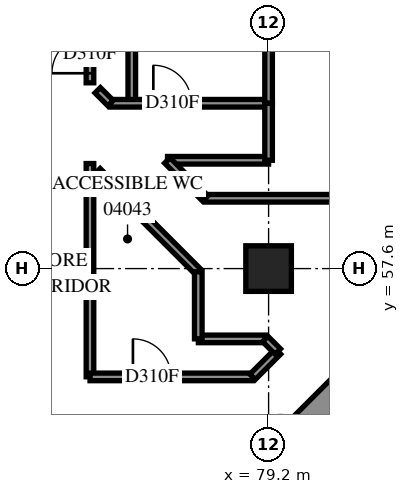
"""IFC4 building model, lengths in metres.
Left out: names, types, materials, properties, quantities, classifications, styles, units other than length and angle.
Written with IfcOpenShell. Run it as: python <this file> out.ifc"""

import sys

from ifc_helpers import new_model, si_unit, direction, frame, frame_2d, origin, origin_2d, place, context, subcontext, project, spatial, polyline, rectangle, outline, extrude, element, fill, save


model = new_model("IFC4")
c1 = context("Model", 3, precision=1e-05, world=origin(), true_north=direction((0.0, 1.0)))
c2 = subcontext(c1, "Body", "Model", "MODEL_VIEW")
j1 = project(units=[si_unit("LENGTHUNIT", "METRE"), si_unit("PLANEANGLEUNIT", "RADIAN")], contexts=[c1])
p1 = place(None, origin())
s1 = spatial("IfcSite", under=j1, at=p1, CompositionType="ELEMENT")
p2 = place(p1, origin())
s2 = spatial("IfcBuilding", under=s1, at=p2, CompositionType="ELEMENT")
p3 = place(p2, frame((0.0, 0.0, 18.6)))
s3 = spatial("IfcBuildingStorey", under=s2, at=p3, CompositionType="ELEMENT", Elevation=18.6)
p4 = place(p3, frame((79.2, 57.6, 0.0), z_axis=(0.0, 0.0, 1.0), x_axis=(1.0, 0.0, 0.0)))
e1 = element("IfcColumn", 1, at=p4, inside=s3, PredefinedType="COLUMN", context=c2, shape_type="SweptSolid", body=[
    extrude(rectangle(XDim=1.2, YDim=1.2, at=origin_2d()), origin(), (0.0, 0.0, 1.0), 3.8),
])
p5 = place(p3, frame((76.301, 49.443, -0.4), z_axis=(0.0, 0.0, 1.0), x_axis=(0.7071067812, 0.7071067812, 0.0)))
e2 = element("IfcWall", 2, at=p5, inside=s3, PredefinedType="SHEAR", context=c2, shape_type="SweptSolid", body=[
    extrude(rectangle(XDim=14.4, YDim=1.0, at=frame_2d((7.2, 0.0))), origin(), (0.0, 0.0, 1.0), 3.5),
])
p6 = place(p5, frame((4.55, 0.0, 0.4)))
e3 = element("IfcOpeningElement", 3, at=p6, cuts=e2, PredefinedType="OPENING", context=c2, shape_type="SweptSolid", body=[
    extrude(rectangle(XDim=1.1, YDim=2.1, at=frame_2d((0.55, 1.05))), frame((0.0, 0.51, 0.0), z_axis=(0.0, -1.0, 0.0), x_axis=(1.0, 0.0, 0.0)), (0.0, 0.0, 1.0), 1.02),
])
p7 = place(p5, frame((11.35, 0.0, 0.4)))
e4 = element("IfcOpeningElement", 4, at=p7, cuts=e2, PredefinedType="OPENING", context=c2, shape_type="SweptSolid", body=[
    extrude(rectangle(XDim=1.1, YDim=2.1, at=frame_2d((0.55, 1.05))), frame((0.0, 0.51, 0.0), z_axis=(0.0, -1.0, 0.0), x_axis=(1.0, 0.0, 0.0)), (0.0, 0.0, 1.0), 1.02),
])
p8 = place(p3, frame((117.843, 34.665, 0.0), z_axis=(0.0, 0.0, 1.0), x_axis=(-0.7071067812, 0.7071067812, 0.0)))
e5 = element("IfcWall", 5, at=p8, inside=s3, PredefinedType="SOLIDWALL", context=c2, shape_type="SweptSolid", body=[
    extrude(outline(polyline([(-0.275, -0.275), (54.222, -0.275), (53.994, 0.275), (0.275, 0.275), (-0.275, -0.275)])), origin(), (0.0, 0.0, 1.0), 3.8),
])
p9 = place(p8, frame((0.8, 0.0, 0.7)))
e6 = element("IfcOpeningElement", 6, at=p9, cuts=e5, PredefinedType="OPENING", context=c2, shape_type="SweptSolid", body=[
    extrude(rectangle(XDim=1.8, YDim=2.4, at=frame_2d((0.9, 1.2))), frame((0.0, 0.285, 0.0), z_axis=(0.0, -1.0, 0.0), x_axis=(1.0, 0.0, 0.0)), (0.0, 0.0, 1.0), 0.57),
])
p10 = place(p8, frame((4.225, 0.0, 0.7)))
e7 = element("IfcOpeningElement", 7, at=p10, cuts=e5, PredefinedType="OPENING", context=c2, shape_type="SweptSolid", body=[
    extrude(rectangle(XDim=1.8, YDim=2.4, at=frame_2d((0.9, 1.2))), frame((0.0, 0.285, 0.0), z_axis=(0.0, -1.0, 0.0), x_axis=(1.0, 0.0, 0.0)), (0.0, 0.0, 1.0), 0.57),
])
p11 = place(p8, frame((7.825, 0.0, 0.7)))
e8 = element("IfcOpeningElement", 8, at=p11, cuts=e5, PredefinedType="OPENING", context=c2, shape_type="SweptSolid", body=[
    extrude(rectangle(XDim=1.8, YDim=2.4, at=frame_2d((0.9, 1.2))), frame((0.0, 0.285, 0.0), z_axis=(0.0, -1.0, 0.0), x_axis=(1.0, 0.0, 0.0)), (0.0, 0.0, 1.0), 0.57),
])
p12 = place(p8, frame((11.425, 0.0, 0.7)))
e9 = element("IfcOpeningElement", 9, at=p12, cuts=e5, PredefinedType="OPENING", context=c2, shape_type="SweptSolid", body=[
    extrude(rectangle(XDim=1.8, YDim=2.4, at=frame_2d((0.9, 1.2))), frame((0.0, 0.285, 0.0), z_axis=(0.0, -1.0, 0.0), x_axis=(1.0, 0.0, 0.0)), (0.0, 0.0, 1.0), 0.57),
])
p13 = place(p8, frame((15.025, 0.0, 0.7)))
e10 = element("IfcOpeningElement", 10, at=p13, cuts=e5, PredefinedType="OPENING", context=c2, shape_type="SweptSolid", body=[
    extrude(rectangle(XDim=1.8, YDim=2.4, at=frame_2d((0.9, 1.2))), frame((0.0, 0.285, 0.0), z_axis=(0.0, -1.0, 0.0), x_axis=(1.0, 0.0, 0.0)), (0.0, 0.0, 1.0), 0.57),
])
p14 = place(p8, frame((18.625, 0.0, 0.7)))
e11 = element("IfcOpeningElement", 11, at=p14, cuts=e5, PredefinedType="OPENING", context=c2, shape_type="SweptSolid", body=[
    extrude(rectangle(XDim=1.8, YDim=2.4, at=frame_2d((0.9, 1.2))), frame((0.0, 0.285, 0.0), z_axis=(0.0, -1.0, 0.0), x_axis=(1.0, 0.0, 0.0)), (0.0, 0.0, 1.0), 0.57),
])
p15 = place(p8, frame((22.225, 0.0, 0.7)))
e12 = element("IfcOpeningElement", 12, at=p15, cuts=e5, PredefinedType="OPENING", context=c2, shape_type="SweptSolid", body=[
    extrude(rectangle(XDim=1.8, YDim=2.4, at=frame_2d((0.9, 1.2))), frame((0.0, 0.285, 0.0), z_axis=(0.0, -1.0, 0.0), x_axis=(1.0, 0.0, 0.0)), (0.0, 0.0, 1.0), 0.57),
])
p16 = place(p8, frame((25.825, 0.0, 0.7)))
e13 = element("IfcOpeningElement", 13, at=p16, cuts=e5, PredefinedType="OPENING", context=c2, shape_type="SweptSolid", body=[
    extrude(rectangle(XDim=1.8, YDim=2.4, at=frame_2d((0.9, 1.2))), frame((0.0, 0.285, 0.0), z_axis=(0.0, -1.0, 0.0), x_axis=(1.0, 0.0, 0.0)), (0.0, 0.0, 1.0), 0.57),
])
p17 = place(p8, frame((29.425, 0.0, 0.7)))
e14 = element("IfcOpeningElement", 14, at=p17, cuts=e5, PredefinedType="OPENING", context=c2, shape_type="SweptSolid", body=[
    extrude(rectangle(XDim=1.8, YDim=2.4, at=frame_2d((0.9, 1.2))), frame((0.0, 0.285, 0.0), z_axis=(0.0, -1.0, 0.0), x_axis=(1.0, 0.0, 0.0)), (0.0, 0.0, 1.0), 0.57),
])
p18 = place(p8, frame((33.025, 0.0, 0.7)))
e15 = element("IfcOpeningElement", 15, at=p18, cuts=e5, PredefinedType="OPENING", context=c2, shape_type="SweptSolid", body=[
    extrude(rectangle(XDim=1.8, YDim=2.4, at=frame_2d((0.9, 1.2))), frame((0.0, 0.285, 0.0), z_axis=(0.0, -1.0, 0.0), x_axis=(1.0, 0.0, 0.0)), (0.0, 0.0, 1.0), 0.57),
])
p19 = place(p8, frame((36.625, 0.0, 0.7)))
e16 = element("IfcOpeningElement", 16, at=p19, cuts=e5, PredefinedType="OPENING", context=c2, shape_type="SweptSolid", body=[
    extrude(rectangle(XDim=1.8, YDim=2.4, at=frame_2d((0.9, 1.2))), frame((0.0, 0.285, 0.0), z_axis=(0.0, -1.0, 0.0), x_axis=(1.0, 0.0, 0.0)), (0.0, 0.0, 1.0), 0.57),
])
p20 = place(p8, frame((40.225, 0.0, 0.7)))
e17 = element("IfcOpeningElement", 17, at=p20, cuts=e5, PredefinedType="OPENING", context=c2, shape_type="SweptSolid", body=[
    extrude(rectangle(XDim=1.8, YDim=2.4, at=frame_2d((0.9, 1.2))), frame((0.0, 0.285, 0.0), z_axis=(0.0, -1.0, 0.0), x_axis=(1.0, 0.0, 0.0)), (0.0, 0.0, 1.0), 0.57),
])
p21 = place(p8, frame((43.825, 0.0, 0.7)))
e18 = element("IfcOpeningElement", 18, at=p21, cuts=e5, PredefinedType="OPENING", context=c2, shape_type="SweptSolid", body=[
    extrude(rectangle(XDim=1.8, YDim=2.4, at=frame_2d((0.9, 1.2))), frame((0.0, 0.285, 0.0), z_axis=(0.0, -1.0, 0.0), x_axis=(1.0, 0.0, 0.0)), (0.0, 0.0, 1.0), 0.57),
])
p22 = place(p8, frame((47.425, 0.0, 0.7)))
e19 = element("IfcOpeningElement", 19, at=p22, cuts=e5, PredefinedType="OPENING", context=c2, shape_type="SweptSolid", body=[
    extrude(rectangle(XDim=1.8, YDim=2.4, at=frame_2d((0.9, 1.2))), frame((0.0, 0.285, 0.0), z_axis=(0.0, -1.0, 0.0), x_axis=(1.0, 0.0, 0.0)), (0.0, 0.0, 1.0), 0.57),
])
p23 = place(p8, frame((51.06, 0.0, 0.7)))
e20 = element("IfcOpeningElement", 20, at=p23, cuts=e5, PredefinedType="OPENING", context=c2, shape_type="SweptSolid", body=[
    extrude(rectangle(XDim=1.8, YDim=2.4, at=frame_2d((0.9, 1.2))), frame((0.0, 0.285, 0.0), z_axis=(0.0, -1.0, 0.0), x_axis=(1.0, 0.0, 0.0)), (0.0, 0.0, 1.0), 0.57),
])
p24 = place(p3, frame((75.6, 61.95, 0.0), z_axis=(0.0, 0.0, 1.0), x_axis=(0.0, 1.0, 0.0)))
e21 = element("IfcWall", 21, at=p24, inside=s3, PredefinedType="PARTITIONING", context=c2, shape_type="SweptSolid", body=[
    extrude(rectangle(XDim=10.7, YDim=0.2, at=frame_2d((5.35, 0.0))), origin(), (0.0, 0.0, 1.0), 3.8),
])
p25 = place(p3, frame((74.5, 54.752, 0.0), z_axis=(0.0, 0.0, 1.0), x_axis=(0.0, 1.0, 0.0)))
e22 = element("IfcWall", 22, at=p25, inside=s3, PredefinedType="PARTITIONING", context=c2, shape_type="SweptSolid", body=[
    extrude(rectangle(XDim=5.612, YDim=0.2, at=frame_2d((2.806, 0.0))), origin(), (0.0, 0.0, 1.0), 3.8),
])
p26 = place(p3, frame((74.5, 62.488, 0.0), z_axis=(0.0, 0.0, 1.0), x_axis=(0.0, 1.0, 0.0)))
e23 = element("IfcWall", 23, at=p26, inside=s3, PredefinedType="PARTITIONING", context=c2, shape_type="SweptSolid", body=[
    extrude(rectangle(XDim=4.812, YDim=0.2, at=frame_2d((2.406, 0.0))), origin(), (0.0, 0.0, 1.0), 3.8),
])
p27 = place(p26, frame((0.252, 0.0, 0.0)))
e24 = element("IfcOpeningElement", 24, at=p27, cuts=e23, PredefinedType="OPENING", context=c2, shape_type="SweptSolid", body=[
    extrude(rectangle(XDim=1.0, YDim=2.1, at=frame_2d((0.5, 1.05))), frame((0.0, 0.11, 0.0), z_axis=(0.0, -1.0, 0.0), x_axis=(1.0, 0.0, 0.0)), (0.0, 0.0, 1.0), 0.22),
])
p28 = place(p3, frame((74.502, 54.75, 0.0), z_axis=(0.0, 0.0, 1.0), x_axis=(1.0, 0.0, 0.0)))
e25 = element("IfcWall", 25, at=p28, inside=s3, PredefinedType="PARTITIONING", context=c2, shape_type="SweptSolid", body=[
    extrude(rectangle(XDim=4.276, YDim=0.2, at=frame_2d((2.138, 0.0))), origin(), (0.0, 0.0, 1.0), 3.8),
])
p29 = place(p28, frame((1.129, 0.0, 0.0)))
e26 = element("IfcOpeningElement", 26, at=p29, cuts=e25, PredefinedType="OPENING", context=c2, shape_type="SweptSolid", body=[
    extrude(rectangle(XDim=1.0, YDim=2.1, at=frame_2d((0.5, 1.05))), frame((0.0, 0.11, 0.0), z_axis=(0.0, -1.0, 0.0), x_axis=(1.0, 0.0, 0.0)), (0.0, 0.0, 1.0), 0.22),
])
p30 = place(p3, frame((75.038, 61.95, 0.0), z_axis=(0.0, 0.0, 1.0), x_axis=(1.0, 0.0, 0.0)))
e27 = element("IfcWall", 27, at=p30, inside=s3, PredefinedType="PARTITIONING", context=c2, shape_type="SweptSolid", body=[
    extrude(rectangle(XDim=4.162, YDim=0.2, at=frame_2d((2.081, 0.0))), origin(), (0.0, 0.0, 1.0), 3.8),
])
p31 = place(p30, frame((1.129, 0.0, 0.0)))
e28 = element("IfcOpeningElement", 28, at=p31, cuts=e27, PredefinedType="OPENING", context=c2, shape_type="SweptSolid", body=[
    extrude(rectangle(XDim=1.0, YDim=2.1, at=frame_2d((0.5, 1.05))), frame((0.0, 0.11, 0.0), z_axis=(0.0, -1.0, 0.0), x_axis=(1.0, 0.0, 0.0)), (0.0, 0.0, 1.0), 0.22),
])
p32 = place(p3, frame((74.697, 60.163, 0.0), z_axis=(0.0, 0.0, 1.0), x_axis=(0.7071067812, -0.7071067812, 0.0)))
e29 = element("IfcWall", 29, at=p32, inside=s3, PredefinedType="PARTITIONING", context=c2, shape_type="SweptSolid", body=[
    extrude(rectangle(XDim=3.748, YDim=0.2, at=frame_2d((1.874, 0.0))), origin(), (0.0, 0.0, 1.0), 3.8),
])
p33 = place(p3, frame((77.538, 59.45, 0.0), z_axis=(0.0, 0.0, 1.0), x_axis=(1.0, 0.0, 0.0)))
e30 = element("IfcWall", 30, at=p33, inside=s3, PredefinedType="PARTITIONING", context=c2, shape_type="SweptSolid", body=[
    extrude(rectangle(XDim=3.512, YDim=0.2, at=frame_2d((1.756, 0.0))), origin(), (0.0, 0.0, 1.0), 3.8),
])
p34 = place(p3, frame((76.54, 60.45, 0.0), z_axis=(0.0, 0.0, 1.0), x_axis=(1.0, 0.0, 0.0)))
e31 = element("IfcWall", 31, at=p34, inside=s3, PredefinedType="PARTITIONING", context=c2, shape_type="SweptSolid", body=[
    extrude(rectangle(XDim=2.66, YDim=0.2, at=frame_2d((1.33, 0.0))), origin(), (0.0, 0.0, 1.0), 3.8),
])
p35 = place(p3, frame((79.2, 61.95, 0.0), z_axis=(0.0, 0.0, 1.0), x_axis=(0.0, 1.0, 0.0)))
e32 = element("IfcWall", 32, at=p35, inside=s3, PredefinedType="PARTITIONING", context=c2, shape_type="SweptSolid", body=[
    extrude(rectangle(XDim=2.25, YDim=0.2, at=frame_2d((1.125, 0.0))), origin(), (0.0, 0.0, 1.0), 3.8),
])
for number, where, z_axis, x_axis in (
    (33, (77.352, 55.75, 0.0), (0.0, 0.0, 1.0), (1.0, 0.0, 0.0)),
    (34, (77.35, 55.752, 0.0), (0.0, 0.0, 1.0), (0.0, 1.0, 0.0)),
):
    element("IfcWall", number, at=place(p3, frame(where, z_axis=z_axis, x_axis=x_axis)), inside=s3, PredefinedType="PARTITIONING", context=c2, shape_type="SweptSolid", body=[
        extrude(rectangle(XDim=1.764, YDim=0.2, at=frame_2d((0.882, 0.0))), origin(), (0.0, 0.0, 1.0), 3.8),
    ])
p36 = place(p3, frame((79.2, 60.45, 0.0), z_axis=(0.0, 0.0, 1.0), x_axis=(0.0, 1.0, 0.0)))
e35 = element("IfcWall", 35, at=p36, inside=s3, PredefinedType="PARTITIONING", context=c2, shape_type="SweptSolid", body=[
    extrude(rectangle(XDim=1.5, YDim=0.2, at=frame_2d((0.75, 0.0))), origin(), (0.0, 0.0, 1.0), 3.8),
])
p37 = place(p3, frame((76.535, 60.445, 0.0), z_axis=(0.0, 0.0, 1.0), x_axis=(0.7071067812, -0.7071067812, 0.0)))
e36 = element("IfcWall", 36, at=p37, inside=s3, PredefinedType="PARTITIONING", context=c2, shape_type="SweptSolid", body=[
    extrude(rectangle(XDim=1.411, YDim=0.2, at=frame_2d((0.706, 0.0))), origin(), (0.0, 0.0, 1.0), 3.8),
])
p38 = place(p3, frame((78.779, 54.751, 0.0), z_axis=(0.0, 0.0, 1.0), x_axis=(0.7071067812, 0.7071067812, 0.0)))
e37 = element("IfcWall", 37, at=p38, inside=s3, PredefinedType="PARTITIONING", context=c2, shape_type="SweptSolid", body=[
    extrude(rectangle(XDim=0.945, YDim=0.2, at=frame_2d((0.472, 0.0))), origin(), (0.0, 0.0, 1.0), 3.8),
])
p39 = place(p3, frame((74.703, 62.291, 0.0), z_axis=(0.0, 0.0, 1.0), x_axis=(0.7071067812, -0.7071067812, 0.0)))
e38 = element("IfcWall", 38, at=p39, inside=s3, PredefinedType="PARTITIONING", context=c2, shape_type="SweptSolid", body=[
    extrude(rectangle(XDim=0.478, YDim=0.2, at=frame_2d((0.239, 0.0))), origin(), (0.0, 0.0, 1.0), 3.8),
])
p40 = place(p3, frame((79.113, 55.747, 0.0), z_axis=(0.0, 0.0, 1.0), x_axis=(0.7071067812, -0.7071067812, 0.0)))
e39 = element("IfcWall", 39, at=p40, inside=s3, PredefinedType="PARTITIONING", context=c2, shape_type="SweptSolid", body=[
    extrude(rectangle(XDim=0.467, YDim=0.2, at=frame_2d((0.233, 0.0))), origin(), (0.0, 0.0, 1.0), 3.8),
])
p41 = place(p29, origin())
e40 = element("IfcDoor", 40, at=p41, inside=s3, OperationType="SINGLE_SWING_LEFT", PredefinedType="DOOR", context=c2, shape_type="SweptSolid", body=[
    extrude(rectangle(XDim=1.0, YDim=2.1, at=frame_2d((0.5, 1.05))), frame((0.0, 0.025, 0.0), z_axis=(0.0, -1.0, 0.0), x_axis=(1.0, 0.0, 0.0)), (0.0, 0.0, 1.0), 0.05),
])
fill(e26, e40)
p42 = place(p27, origin())
e41 = element("IfcDoor", 41, at=p42, inside=s3, OperationType="SINGLE_SWING_RIGHT", PredefinedType="DOOR", context=c2, shape_type="SweptSolid", body=[
    extrude(rectangle(XDim=1.0, YDim=2.1, at=frame_2d((0.5, 1.05))), frame((0.0, 0.025, 0.0), z_axis=(0.0, -1.0, 0.0), x_axis=(1.0, 0.0, 0.0)), (0.0, 0.0, 1.0), 0.05),
])
fill(e24, e41)
p43 = place(p31, origin())
e42 = element("IfcDoor", 42, at=p43, inside=s3, OperationType="SINGLE_SWING_LEFT", PredefinedType="DOOR", context=c2, shape_type="SweptSolid", body=[
    extrude(rectangle(XDim=1.0, YDim=2.1, at=frame_2d((0.5, 1.05))), frame((0.0, 0.025, 0.0), z_axis=(0.0, -1.0, 0.0), x_axis=(1.0, 0.0, 0.0)), (0.0, 0.0, 1.0), 0.05),
])
fill(e28, e42)
save(model, sys.argv[1])
